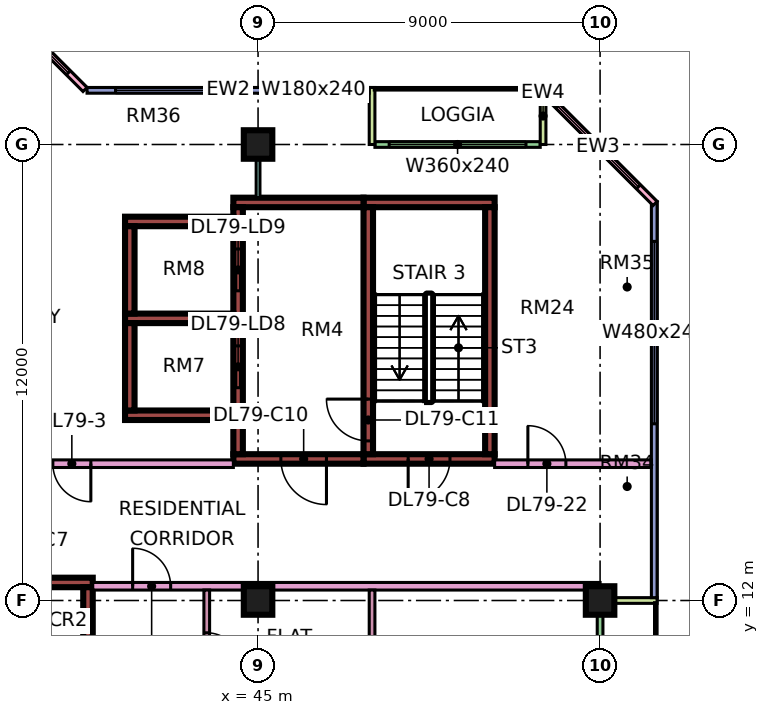
"""IFC4 building model, lengths in metres.
Left out: names, types, materials, properties, quantities, classifications, styles, units other than length and angle.
Written with IfcOpenShell. Run it as: python <this file> out.ifc"""

import sys

from ifc_helpers import new_model, si_unit, direction, frame, frame_2d, origin, origin_2d, place, context, subcontext, project, spatial, rectangle, extrude, element, fill, save


model = new_model("IFC4")
c1 = context("Model", 3, precision=1e-05, world=origin(), true_north=direction((0.0, 1.0)))
c2 = subcontext(c1, "Body", "Model", "MODEL_VIEW")
j1 = project(units=[si_unit("LENGTHUNIT", "METRE"), si_unit("PLANEANGLEUNIT", "RADIAN")], contexts=[c1])
p1 = place(None, origin())
s1 = spatial("IfcSite", under=j1, at=p1, CompositionType="ELEMENT")
p2 = place(p1, origin())
s2 = spatial("IfcBuilding", under=s1, at=p2, CompositionType="ELEMENT")
p3 = place(p2, frame((0.0, 0.0, 342.65)))
s3 = spatial("IfcBuildingStorey", under=s2, at=p3, CompositionType="ELEMENT", Elevation=342.65)
for number, where, z_axis, x_axis in (
    (1, (45.0, 12.0, 0.0), (0.0, 0.0, 1.0), (1.0, 0.0, 0.0)),
    (2, (45.0, 24.0, 0.0), (0.0, 0.0, 1.0), (1.0, 0.0, 0.0)),
    (3, (54.0, 12.0, 0.0), (0.0, 0.0, 1.0), (1.0, 0.0, 0.0)),
):
    element("IfcColumn", number, at=place(p3, frame(where, z_axis=z_axis, x_axis=x_axis)), inside=s3, PredefinedType="COLUMN", context=c2, shape_type="SweptSolid", body=[
        extrude(rectangle(XDim=0.75, YDim=0.75, at=origin_2d()), origin(), (0.0, 0.0, 1.0), 3.75),
    ])
p4 = place(p3, frame((36.375, 12.475, 0.0), z_axis=(0.0, 0.0, 1.0), x_axis=(1.0, 0.0, 0.0)))
e4 = element("IfcWall", 4, at=p4, inside=s3, PredefinedType="SHEAR", context=c2, shape_type="SweptSolid", body=[
    extrude(rectangle(XDim=4.275, YDim=0.25, at=frame_2d((2.137, 0.0))), origin(), (0.0, 0.0, 1.0), 3.75),
])
p5 = place(p4, frame((2.0, 0.0, 0.0)))
e5 = element("IfcOpeningElement", 5, at=p5, cuts=e4, PredefinedType="OPENING", context=c2, shape_type="SweptSolid", body=[
    extrude(rectangle(XDim=1.1, YDim=2.2, at=frame_2d((0.55, 1.1))), frame((0.0, 0.135, 0.0), z_axis=(0.0, -1.0, 0.0), x_axis=(1.0, 0.0, 0.0)), (0.0, 0.0, 1.0), 0.27),
])
p6 = place(p3, frame((40.525, 5.85, 0.0), z_axis=(0.0, 0.0, 1.0), x_axis=(0.0, 1.0, 0.0)))
e6 = element("IfcWall", 6, at=p6, inside=s3, PredefinedType="SHEAR", context=c2, shape_type="SweptSolid", body=[
    extrude(rectangle(XDim=6.5, YDim=0.25, at=frame_2d((3.25, 0.0))), origin(), (0.0, 0.0, 1.0), 3.75),
])
p7 = place(p3, frame((47.775, 15.725, 0.0), z_axis=(0.0, 0.0, 1.0), x_axis=(1.0, 0.0, 0.0)))
e7 = element("IfcWall", 7, at=p7, inside=s3, PredefinedType="SHEAR", context=c2, shape_type="SweptSolid", body=[
    extrude(rectangle(XDim=3.45, YDim=0.25, at=frame_2d((1.725, 0.0))), origin(), (0.0, 0.0, 1.0), 3.75),
])
p8 = place(p7, frame((1.175, 0.0, 0.0)))
e8 = element("IfcOpeningElement", 8, at=p8, cuts=e7, PredefinedType="OPENING", context=c2, shape_type="SweptSolid", body=[
    extrude(rectangle(XDim=1.1, YDim=2.2, at=frame_2d((0.55, 1.1))), frame((0.0, 0.135, 0.0), z_axis=(0.0, -1.0, 0.0), x_axis=(1.0, 0.0, 0.0)), (0.0, 0.0, 1.0), 0.27),
])
p9 = place(p3, frame((47.775, 22.475, 0.0), z_axis=(0.0, 0.0, 1.0), x_axis=(1.0, 0.0, 0.0)))
e9 = element("IfcWall", 9, at=p9, inside=s3, PredefinedType="SHEAR", context=c2, shape_type="SweptSolid", body=[
    extrude(rectangle(XDim=3.45, YDim=0.25, at=frame_2d((1.725, 0.0))), origin(), (0.0, 0.0, 1.0), 3.75),
])
p10 = place(p3, frame((47.9, 15.85, 0.0), z_axis=(0.0, 0.0, 1.0), x_axis=(0.0, 1.0, 0.0)))
e10 = element("IfcWall", 10, at=p10, inside=s3, PredefinedType="SHEAR", context=c2, shape_type="SweptSolid", body=[
    extrude(rectangle(XDim=6.5, YDim=0.25, at=frame_2d((3.25, 0.0))), origin(), (0.0, 0.0, 1.0), 3.75),
])
p11 = place(p10, frame((0.35, 0.0, 0.0)))
e11 = element("IfcOpeningElement", 11, at=p11, cuts=e10, PredefinedType="OPENING", context=c2, shape_type="SweptSolid", body=[
    extrude(rectangle(XDim=1.1, YDim=2.2, at=frame_2d((0.55, 1.1))), frame((0.0, 0.135, 0.0), z_axis=(0.0, -1.0, 0.0), x_axis=(1.0, 0.0, 0.0)), (0.0, 0.0, 1.0), 0.27),
])
p12 = place(p3, frame((51.1, 15.85, 0.0), z_axis=(0.0, 0.0, 1.0), x_axis=(0.0, 1.0, 0.0)))
e12 = element("IfcWall", 12, at=p12, inside=s3, PredefinedType="SHEAR", context=c2, shape_type="SweptSolid", body=[
    extrude(rectangle(XDim=6.5, YDim=0.25, at=frame_2d((3.25, 0.0))), origin(), (0.0, 0.0, 1.0), 3.75),
])
p13 = place(p3, frame((44.35, 15.725, 0.0), z_axis=(0.0, 0.0, 1.0), x_axis=(1.0, 0.0, 0.0)))
e13 = element("IfcWall", 13, at=p13, inside=s3, PredefinedType="SHEAR", context=c2, shape_type="SweptSolid", body=[
    extrude(rectangle(XDim=3.425, YDim=0.25, at=frame_2d((1.712, 0.0))), origin(), (0.0, 0.0, 1.0), 3.75),
])
p14 = place(p13, frame((1.25, 0.0, 0.0)))
e14 = element("IfcOpeningElement", 14, at=p14, cuts=e13, PredefinedType="OPENING", context=c2, shape_type="SweptSolid", body=[
    extrude(rectangle(XDim=1.2, YDim=2.2, at=frame_2d((0.6, 1.1))), frame((0.0, 0.135, 0.0), z_axis=(0.0, -1.0, 0.0), x_axis=(1.0, 0.0, 0.0)), (0.0, 0.0, 1.0), 0.27),
])
p15 = place(p3, frame((44.35, 22.475, 0.0), z_axis=(0.0, 0.0, 1.0), x_axis=(1.0, 0.0, 0.0)))
e15 = element("IfcWall", 15, at=p15, inside=s3, PredefinedType="SHEAR", context=c2, shape_type="SweptSolid", body=[
    extrude(rectangle(XDim=3.425, YDim=0.25, at=frame_2d((1.712, 0.0))), origin(), (0.0, 0.0, 1.0), 3.75),
])
p16 = place(p3, frame((44.475, 15.85, 0.0), z_axis=(0.0, 0.0, 1.0), x_axis=(0.0, 1.0, 0.0)))
e16 = element("IfcWall", 16, at=p16, inside=s3, PredefinedType="SHEAR", context=c2, shape_type="SweptSolid", body=[
    extrude(rectangle(XDim=6.5, YDim=0.25, at=frame_2d((3.25, 0.0))), origin(), (0.0, 0.0, 1.0), 3.75),
])
p17 = place(p16, frame((1.75, 0.0, 0.0)))
e17 = element("IfcOpeningElement", 17, at=p17, cuts=e16, PredefinedType="OPENING", context=c2, shape_type="SweptSolid", body=[
    extrude(rectangle(XDim=1.1, YDim=2.2, at=frame_2d((0.55, 1.1))), frame((0.0, 0.135, 0.0), z_axis=(0.0, -1.0, 0.0), x_axis=(1.0, 0.0, 0.0)), (0.0, 0.0, 1.0), 0.27),
])
p18 = place(p16, frame((4.3, 0.0, 0.0)))
e18 = element("IfcOpeningElement", 18, at=p18, cuts=e16, PredefinedType="OPENING", context=c2, shape_type="SweptSolid", body=[
    extrude(rectangle(XDim=1.1, YDim=2.2, at=frame_2d((0.55, 1.1))), frame((0.0, 0.135, 0.0), z_axis=(0.0, -1.0, 0.0), x_axis=(1.0, 0.0, 0.0)), (0.0, 0.0, 1.0), 0.27),
])
for number, where, z_axis, x_axis in (
    (19, (41.5, 16.875, 0.0), (0.0, 0.0, 1.0), (1.0, 0.0, 0.0)),
    (20, (41.5, 19.425, 0.0), (0.0, 0.0, 1.0), (1.0, 0.0, 0.0)),
    (21, (41.5, 21.975, 0.0), (0.0, 0.0, 1.0), (1.0, 0.0, 0.0)),
):
    element("IfcWall", number, at=place(p3, frame(where, z_axis=z_axis, x_axis=x_axis)), inside=s3, PredefinedType="SHEAR", context=c2, shape_type="SweptSolid", body=[
        extrude(rectangle(XDim=2.85, YDim=0.25, at=frame_2d((1.425, 0.0))), origin(), (0.0, 0.0, 1.0), 3.75),
    ])
for number, where, z_axis, x_axis in (
    (22, (41.625, 17.0, 0.0), (0.0, 0.0, 1.0), (0.0, 1.0, 0.0)),
    (23, (41.625, 19.55, 0.0), (0.0, 0.0, 1.0), (0.0, 1.0, 0.0)),
):
    element("IfcWall", number, at=place(p3, frame(where, z_axis=z_axis, x_axis=x_axis)), inside=s3, PredefinedType="SHEAR", context=c2, shape_type="SweptSolid", body=[
        extrude(rectangle(XDim=2.3, YDim=0.25, at=frame_2d((1.15, 0.0))), origin(), (0.0, 0.0, 1.0), 3.75),
    ])
p19 = place(p3, frame((52.425, 24.0, 0.0), z_axis=(0.0, 0.0, 1.0), x_axis=(-1.0, 0.0, 0.0)))
e24 = element("IfcWall", 24, at=p19, inside=s3, PredefinedType="SOLIDWALL", context=c2, shape_type="SweptSolid", body=[
    extrude(rectangle(XDim=4.35, YDim=0.15, at=frame_2d((2.175, 0.0))), origin(), (0.0, 0.0, 1.0), 3.35),
])
p20 = place(p19, frame((0.375, 0.0, 0.45)))
e25 = element("IfcOpeningElement", 25, at=p20, cuts=e24, PredefinedType="OPENING", context=c2, shape_type="SweptSolid", body=[
    extrude(rectangle(XDim=3.6, YDim=2.4, at=frame_2d((1.8, 1.2))), frame((0.0, 0.085, 0.0), z_axis=(0.0, -1.0, 0.0), x_axis=(1.0, 0.0, 0.0)), (0.0, 0.0, 1.0), 0.17),
])
for number, where, z_axis, x_axis in (
    (26, (52.5, 25.5, 0.0), (0.0, 0.0, 1.0), (0.0, -1.0, 0.0)),
    (27, (48.0, 25.5, 0.0), (0.0, 0.0, 1.0), (0.0, -1.0, 0.0)),
):
    element("IfcWall", number, at=place(p3, frame(where, z_axis=z_axis, x_axis=x_axis)), inside=s3, PredefinedType="SOLIDWALL", context=c2, shape_type="SweptSolid", body=[
        extrude(rectangle(XDim=1.5, YDim=0.15, at=frame_2d((0.75, 0.0))), origin(), (0.0, 0.0, 1.0), 3.35),
    ])
p21 = place(p3, frame((47.925, 25.425, 0.0), z_axis=(0.0, 0.0, 1.0), x_axis=(-1.0, 0.0, 0.0)))
e28 = element("IfcWall", 28, at=p21, inside=s3, PredefinedType="SOLIDWALL", context=c2, shape_type="SweptSolid", body=[
    extrude(rectangle(XDim=7.425, YDim=0.15, at=frame_2d((3.712, 0.0))), origin(), (0.0, 0.0, 1.0), 3.35),
])
p22 = place(p21, frame((0.562, 0.0, 0.45)))
e29 = element("IfcOpeningElement", 29, at=p22, cuts=e28, PredefinedType="OPENING", context=c2, shape_type="SweptSolid", body=[
    extrude(rectangle(XDim=1.8, YDim=2.4, at=frame_2d((0.9, 1.2))), frame((0.0, 0.085, 0.0), z_axis=(0.0, -1.0, 0.0), x_axis=(1.0, 0.0, 0.0)), (0.0, 0.0, 1.0), 0.17),
])
p23 = place(p21, frame((3.675, 0.0, 0.45)))
e30 = element("IfcOpeningElement", 30, at=p23, cuts=e28, PredefinedType="OPENING", context=c2, shape_type="SweptSolid", body=[
    extrude(rectangle(XDim=3.0, YDim=2.4, at=frame_2d((1.5, 1.2))), frame((0.0, 0.085, 0.0), z_axis=(0.0, -1.0, 0.0), x_axis=(1.0, 0.0, 0.0)), (0.0, 0.0, 1.0), 0.17),
])
p24 = place(p3, frame((40.447, 25.447, 0.0), z_axis=(0.0, 0.0, 1.0), x_axis=(-0.707106781187, 0.707106781187, 0.0)))
e31 = element("IfcWall", 31, at=p24, inside=s3, PredefinedType="SOLIDWALL", context=c2, shape_type="SweptSolid", body=[
    extrude(rectangle(XDim=4.243, YDim=0.15, at=frame_2d((2.121, 0.0))), origin(), (0.0, 0.0, 1.0), 3.35),
])
p25 = place(p24, frame((0.621, 0.0, 0.45)))
e32 = element("IfcOpeningElement", 32, at=p25, cuts=e31, PredefinedType="OPENING", context=c2, shape_type="SweptSolid", body=[
    extrude(rectangle(XDim=3.0, YDim=2.4, at=frame_2d((1.5, 1.2))), frame((0.0, 0.085, 0.0), z_axis=(0.0, -1.0, 0.0), x_axis=(1.0, 0.0, 0.0)), (0.0, 0.0, 1.0), 0.17),
])
p26 = place(p3, frame((54.0, 1.575, 0.0), z_axis=(0.0, 0.0, 1.0), x_axis=(0.0, 1.0, 0.0)))
e33 = element("IfcWall", 33, at=p26, inside=s3, PredefinedType="SOLIDWALL", context=c2, shape_type="SweptSolid", body=[
    extrude(rectangle(XDim=10.35, YDim=0.15, at=frame_2d((5.175, 0.0))), origin(), (0.0, 0.0, 1.0), 3.35),
])
p27 = place(p26, frame((0.663, 0.0, 0.0)))
e34 = element("IfcOpeningElement", 34, at=p27, cuts=e33, PredefinedType="OPENING", context=c2, shape_type="SweptSolid", body=[
    extrude(rectangle(XDim=1.8, YDim=2.4, at=frame_2d((0.9, 1.2))), frame((0.0, 0.085, 0.0), z_axis=(0.0, -1.0, 0.0), x_axis=(1.0, 0.0, 0.0)), (0.0, 0.0, 1.0), 0.17),
])
p28 = place(p26, frame((5.637, 0.0, 0.45)))
e35 = element("IfcOpeningElement", 35, at=p28, cuts=e33, PredefinedType="OPENING", context=c2, shape_type="SweptSolid", body=[
    extrude(rectangle(XDim=3.0, YDim=2.4, at=frame_2d((1.5, 1.2))), frame((0.0, 0.085, 0.0), z_axis=(0.0, -1.0, 0.0), x_axis=(1.0, 0.0, 0.0)), (0.0, 0.0, 1.0), 0.17),
])
p29 = place(p3, frame((55.5, 12.0, 0.0), z_axis=(0.0, 0.0, 1.0), x_axis=(-1.0, 0.0, 0.0)))
e36 = element("IfcWall", 36, at=p29, inside=s3, PredefinedType="SOLIDWALL", context=c2, shape_type="SweptSolid", body=[
    extrude(rectangle(XDim=1.5, YDim=0.15, at=frame_2d((0.75, 0.0))), origin(), (0.0, 0.0, 1.0), 3.35),
])
p30 = place(p3, frame((55.425, 12.075, 0.0), z_axis=(0.0, 0.0, 1.0), x_axis=(0.0, 1.0, 0.0)))
e37 = element("IfcWall", 37, at=p30, inside=s3, PredefinedType="SOLIDWALL", context=c2, shape_type="SweptSolid", body=[
    extrude(rectangle(XDim=10.425, YDim=0.15, at=frame_2d((5.212, 0.0))), origin(), (0.0, 0.0, 1.0), 3.35),
])
p31 = place(p30, frame((4.575, 0.0, 0.45)))
e38 = element("IfcOpeningElement", 38, at=p31, cuts=e37, PredefinedType="OPENING", context=c2, shape_type="SweptSolid", body=[
    extrude(rectangle(XDim=4.8, YDim=2.4, at=frame_2d((2.4, 1.2))), frame((0.0, 0.085, 0.0), z_axis=(0.0, -1.0, 0.0), x_axis=(1.0, 0.0, 0.0)), (0.0, 0.0, 1.0), 0.17),
])
p32 = place(p3, frame((55.447, 22.447, 0.0), z_axis=(0.0, 0.0, 1.0), x_axis=(-0.707106781187, 0.707106781187, 0.0)))
e39 = element("IfcWall", 39, at=p32, inside=s3, PredefinedType="SOLIDWALL", context=c2, shape_type="SweptSolid", body=[
    extrude(rectangle(XDim=4.243, YDim=0.15, at=frame_2d((2.121, 0.0))), origin(), (0.0, 0.0, 1.0), 3.35),
])
p33 = place(p32, frame((0.621, 0.0, 0.45)))
e40 = element("IfcOpeningElement", 40, at=p33, cuts=e39, PredefinedType="OPENING", context=c2, shape_type="SweptSolid", body=[
    extrude(rectangle(XDim=3.0, YDim=2.4, at=frame_2d((1.5, 1.2))), frame((0.0, 0.085, 0.0), z_axis=(0.0, -1.0, 0.0), x_axis=(1.0, 0.0, 0.0)), (0.0, 0.0, 1.0), 0.17),
])
p34 = place(p3, frame((34.0, 15.6, 0.0), z_axis=(0.0, 0.0, 1.0), x_axis=(1.0, 0.0, 0.0)))
e41 = element("IfcWall", 41, at=p34, inside=s3, PredefinedType="PARTITIONING", context=c2, shape_type="SweptSolid", body=[
    extrude(rectangle(XDim=10.35, YDim=0.2, at=frame_2d((5.175, 0.0))), origin(), (0.0, 0.0, 1.0), 3.35),
])
p35 = place(p34, frame((5.6, 0.0, 0.0)))
e42 = element("IfcOpeningElement", 42, at=p35, cuts=e41, PredefinedType="OPENING", context=c2, shape_type="SweptSolid", body=[
    extrude(rectangle(XDim=1.0, YDim=2.1, at=frame_2d((0.5, 1.05))), frame((0.0, 0.11, 0.0), z_axis=(0.0, -1.0, 0.0), x_axis=(1.0, 0.0, 0.0)), (0.0, 0.0, 1.0), 0.22),
])
p36 = place(p34, frame((0.45, 0.0, 0.0)))
e43 = element("IfcOpeningElement", 43, at=p36, cuts=e41, PredefinedType="OPENING", context=c2, shape_type="SweptSolid", body=[
    extrude(rectangle(XDim=1.2, YDim=2.1, at=frame_2d((0.6, 1.05))), frame((0.0, 0.11, 0.0), z_axis=(0.0, -1.0, 0.0), x_axis=(1.0, 0.0, 0.0)), (0.0, 0.0, 1.0), 0.22),
])
p37 = place(p3, frame((40.65, 12.375, 0.0), z_axis=(0.0, 0.0, 1.0), x_axis=(1.0, 0.0, 0.0)))
e44 = element("IfcWall", 44, at=p37, inside=s3, PredefinedType="PARTITIONING", context=c2, shape_type="SweptSolid", body=[
    extrude(rectangle(XDim=13.35, YDim=0.2, at=frame_2d((6.675, 0.0))), origin(), (0.0, 0.0, 1.0), 3.35),
])
p38 = place(p37, frame((1.05, 0.0, 0.0)))
e45 = element("IfcOpeningElement", 45, at=p38, cuts=e44, PredefinedType="OPENING", context=c2, shape_type="SweptSolid", body=[
    extrude(rectangle(XDim=1.0, YDim=2.1, at=frame_2d((0.5, 1.05))), frame((0.0, 0.11, 0.0), z_axis=(0.0, -1.0, 0.0), x_axis=(1.0, 0.0, 0.0)), (0.0, 0.0, 1.0), 0.22),
])
p39 = place(p3, frame((43.65, 5.975, 0.0), z_axis=(0.0, 0.0, 1.0), x_axis=(0.0, 1.0, 0.0)))
e46 = element("IfcWall", 46, at=p39, inside=s3, PredefinedType="PARTITIONING", context=c2, shape_type="SweptSolid", body=[
    extrude(rectangle(XDim=6.3, YDim=0.15, at=frame_2d((3.15, 0.0))), origin(), (0.0, 0.0, 1.0), 3.35),
])
p40 = place(p39, frame((4.275, 0.0, 0.0)))
e47 = element("IfcOpeningElement", 47, at=p40, cuts=e46, PredefinedType="OPENING", context=c2, shape_type="SweptSolid", body=[
    extrude(rectangle(XDim=0.9, YDim=2.1, at=frame_2d((0.45, 1.05))), frame((0.0, 0.085, 0.0), z_axis=(0.0, -1.0, 0.0), x_axis=(1.0, 0.0, 0.0)), (0.0, 0.0, 1.0), 0.17),
])
p41 = place(p3, frame((45.0, 22.6, 0.0), z_axis=(0.0, 0.0, 1.0), x_axis=(0.0, 1.0, 0.0)))
e48 = element("IfcWall", 48, at=p41, inside=s3, PredefinedType="PARTITIONING", context=c2, shape_type="SweptSolid", body=[
    extrude(rectangle(XDim=1.4, YDim=0.1, at=frame_2d((0.7, 0.0))), origin(), (0.0, 0.0, 1.0), 3.35),
])
p42 = place(p3, frame((48.0, 5.975, 0.0), z_axis=(0.0, 0.0, 1.0), x_axis=(0.0, 1.0, 0.0)))
e49 = element("IfcWall", 49, at=p42, inside=s3, PredefinedType="PARTITIONING", context=c2, shape_type="SweptSolid", body=[
    extrude(rectangle(XDim=6.3, YDim=0.15, at=frame_2d((3.15, 0.0))), origin(), (0.0, 0.0, 1.0), 3.35),
])
p43 = place(p3, frame((51.225, 15.6, 0.0), z_axis=(0.0, 0.0, 1.0), x_axis=(1.0, 0.0, 0.0)))
e50 = element("IfcWall", 50, at=p43, inside=s3, PredefinedType="PARTITIONING", context=c2, shape_type="SweptSolid", body=[
    extrude(rectangle(XDim=4.125, YDim=0.2, at=frame_2d((2.062, 0.0))), origin(), (0.0, 0.0, 1.0), 3.35),
])
p44 = place(p43, frame((0.875, 0.0, 0.0)))
e51 = element("IfcOpeningElement", 51, at=p44, cuts=e50, PredefinedType="OPENING", context=c2, shape_type="SweptSolid", body=[
    extrude(rectangle(XDim=1.0, YDim=2.1, at=frame_2d((0.5, 1.05))), frame((0.0, 0.11, 0.0), z_axis=(0.0, -1.0, 0.0), x_axis=(1.0, 0.0, 0.0)), (0.0, 0.0, 1.0), 0.22),
])
p45 = place(p20, origin())
e52 = element("IfcWindow", 52, at=p45, inside=s3, PartitioningType="SINGLE_PANEL", PredefinedType="WINDOW", context=c2, shape_type="SweptSolid", body=[
    extrude(rectangle(XDim=3.6, YDim=2.4, at=frame_2d((1.8, 1.2))), frame((0.0, 0.03, 0.0), z_axis=(0.0, -1.0, 0.0), x_axis=(1.0, 0.0, 0.0)), (0.0, 0.0, 1.0), 0.06),
])
fill(e25, e52)
p46 = place(p22, origin())
e53 = element("IfcWindow", 53, at=p46, inside=s3, PartitioningType="SINGLE_PANEL", PredefinedType="WINDOW", context=c2, shape_type="SweptSolid", body=[
    extrude(rectangle(XDim=1.8, YDim=2.4, at=frame_2d((0.9, 1.2))), frame((0.0, 0.03, 0.0), z_axis=(0.0, -1.0, 0.0), x_axis=(1.0, 0.0, 0.0)), (0.0, 0.0, 1.0), 0.06),
])
fill(e29, e53)
p47 = place(p23, origin())
e54 = element("IfcWindow", 54, at=p47, inside=s3, PartitioningType="SINGLE_PANEL", PredefinedType="WINDOW", context=c2, shape_type="SweptSolid", body=[
    extrude(rectangle(XDim=3.0, YDim=2.4, at=frame_2d((1.5, 1.2))), frame((0.0, 0.03, 0.0), z_axis=(0.0, -1.0, 0.0), x_axis=(1.0, 0.0, 0.0)), (0.0, 0.0, 1.0), 0.06),
])
fill(e30, e54)
p48 = place(p25, origin())
e55 = element("IfcWindow", 55, at=p48, inside=s3, PartitioningType="SINGLE_PANEL", PredefinedType="WINDOW", context=c2, shape_type="SweptSolid", body=[
    extrude(rectangle(XDim=3.0, YDim=2.4, at=frame_2d((1.5, 1.2))), frame((0.0, 0.03, 0.0), z_axis=(0.0, -1.0, 0.0), x_axis=(1.0, 0.0, 0.0)), (0.0, 0.0, 1.0), 0.06),
])
fill(e32, e55)
p49 = place(p31, origin())
e56 = element("IfcWindow", 56, at=p49, inside=s3, PartitioningType="SINGLE_PANEL", PredefinedType="WINDOW", context=c2, shape_type="SweptSolid", body=[
    extrude(rectangle(XDim=4.8, YDim=2.4, at=frame_2d((2.4, 1.2))), frame((0.0, 0.03, 0.0), z_axis=(0.0, -1.0, 0.0), x_axis=(1.0, 0.0, 0.0)), (0.0, 0.0, 1.0), 0.06),
])
fill(e38, e56)
p50 = place(p33, origin())
e57 = element("IfcWindow", 57, at=p50, inside=s3, PartitioningType="SINGLE_PANEL", PredefinedType="WINDOW", context=c2, shape_type="SweptSolid", body=[
    extrude(rectangle(XDim=3.0, YDim=2.4, at=frame_2d((1.5, 1.2))), frame((0.0, 0.03, 0.0), z_axis=(0.0, -1.0, 0.0), x_axis=(1.0, 0.0, 0.0)), (0.0, 0.0, 1.0), 0.06),
])
fill(e40, e57)
p51 = place(p8, frame((1.1, 0.0, 0.0), z_axis=(0.0, 0.0, 1.0), x_axis=(-1.0, 0.0, 0.0)))
e58 = element("IfcDoor", 58, at=p51, inside=s3, OperationType="SINGLE_SWING_LEFT", PredefinedType="DOOR", context=c2, shape_type="SweptSolid", body=[
    extrude(rectangle(XDim=1.1, YDim=2.2, at=frame_2d((0.55, 1.1))), frame((0.0, 0.025, 0.0), z_axis=(0.0, -1.0, 0.0), x_axis=(1.0, 0.0, 0.0)), (0.0, 0.0, 1.0), 0.05),
])
fill(e8, e58)
p52 = place(p14, origin())
e59 = element("IfcDoor", 59, at=p52, inside=s3, OperationType="SINGLE_SWING_RIGHT", PredefinedType="DOOR", context=c2, shape_type="SweptSolid", body=[
    extrude(rectangle(XDim=1.2, YDim=2.2, at=frame_2d((0.6, 1.1))), frame((0.0, 0.025, 0.0), z_axis=(0.0, -1.0, 0.0), x_axis=(1.0, 0.0, 0.0)), (0.0, 0.0, 1.0), 0.05),
])
fill(e14, e59)
p53 = place(p11, frame((1.1, 0.0, 0.0), z_axis=(0.0, 0.0, 1.0), x_axis=(-1.0, 0.0, 0.0)))
e60 = element("IfcDoor", 60, at=p53, inside=s3, OperationType="SINGLE_SWING_RIGHT", PredefinedType="DOOR", context=c2, shape_type="SweptSolid", body=[
    extrude(rectangle(XDim=1.1, YDim=2.2, at=frame_2d((0.55, 1.1))), frame((0.0, 0.025, 0.0), z_axis=(0.0, -1.0, 0.0), x_axis=(1.0, 0.0, 0.0)), (0.0, 0.0, 1.0), 0.05),
])
fill(e11, e60)
p54 = place(p17, origin())
e61 = element("IfcDoor", 61, at=p54, inside=s3, OperationType="DOUBLE_DOOR_SLIDING", PredefinedType="DOOR", context=c2, shape_type="SweptSolid", body=[
    extrude(rectangle(XDim=1.1, YDim=2.2, at=frame_2d((0.55, 1.1))), frame((0.0, 0.025, 0.0), z_axis=(0.0, -1.0, 0.0), x_axis=(1.0, 0.0, 0.0)), (0.0, 0.0, 1.0), 0.05),
])
fill(e17, e61)
p55 = place(p18, origin())
e62 = element("IfcDoor", 62, at=p55, inside=s3, OperationType="DOUBLE_DOOR_SLIDING", PredefinedType="DOOR", context=c2, shape_type="SweptSolid", body=[
    extrude(rectangle(XDim=1.1, YDim=2.2, at=frame_2d((0.55, 1.1))), frame((0.0, 0.025, 0.0), z_axis=(0.0, -1.0, 0.0), x_axis=(1.0, 0.0, 0.0)), (0.0, 0.0, 1.0), 0.05),
])
fill(e18, e62)
p56 = place(p35, origin())
e63 = element("IfcDoor", 63, at=p56, inside=s3, OperationType="SINGLE_SWING_RIGHT", PredefinedType="DOOR", context=c2, shape_type="SweptSolid", body=[
    extrude(rectangle(XDim=1.0, YDim=2.1, at=frame_2d((0.5, 1.05))), frame((0.0, 0.025, 0.0), z_axis=(0.0, -1.0, 0.0), x_axis=(1.0, 0.0, 0.0)), (0.0, 0.0, 1.0), 0.05),
])
fill(e42, e63)
p57 = place(p44, origin())
e64 = element("IfcDoor", 64, at=p57, inside=s3, OperationType="SINGLE_SWING_LEFT", PredefinedType="DOOR", context=c2, shape_type="SweptSolid", body=[
    extrude(rectangle(XDim=1.0, YDim=2.1, at=frame_2d((0.5, 1.05))), frame((0.0, 0.025, 0.0), z_axis=(0.0, -1.0, 0.0), x_axis=(1.0, 0.0, 0.0)), (0.0, 0.0, 1.0), 0.05),
])
fill(e51, e64)
p58 = place(p38, origin())
e65 = element("IfcDoor", 65, at=p58, inside=s3, OperationType="SINGLE_SWING_LEFT", PredefinedType="DOOR", context=c2, shape_type="SweptSolid", body=[
    extrude(rectangle(XDim=1.0, YDim=2.1, at=frame_2d((0.5, 1.05))), frame((0.0, 0.025, 0.0), z_axis=(0.0, -1.0, 0.0), x_axis=(1.0, 0.0, 0.0)), (0.0, 0.0, 1.0), 0.05),
])
fill(e45, e65)
p59 = place(p40, frame((0.9, 0.0, 0.0), z_axis=(0.0, 0.0, 1.0), x_axis=(-1.0, 0.0, 0.0)))
e66 = element("IfcDoor", 66, at=p59, inside=s3, OperationType="SINGLE_SWING_LEFT", PredefinedType="DOOR", context=c2, shape_type="SweptSolid", body=[
    extrude(rectangle(XDim=0.9, YDim=2.1, at=frame_2d((0.45, 1.05))), frame((0.0, 0.025, 0.0), z_axis=(0.0, -1.0, 0.0), x_axis=(1.0, 0.0, 0.0)), (0.0, 0.0, 1.0), 0.05),
])
fill(e47, e66)
save(model, sys.argv[1])
